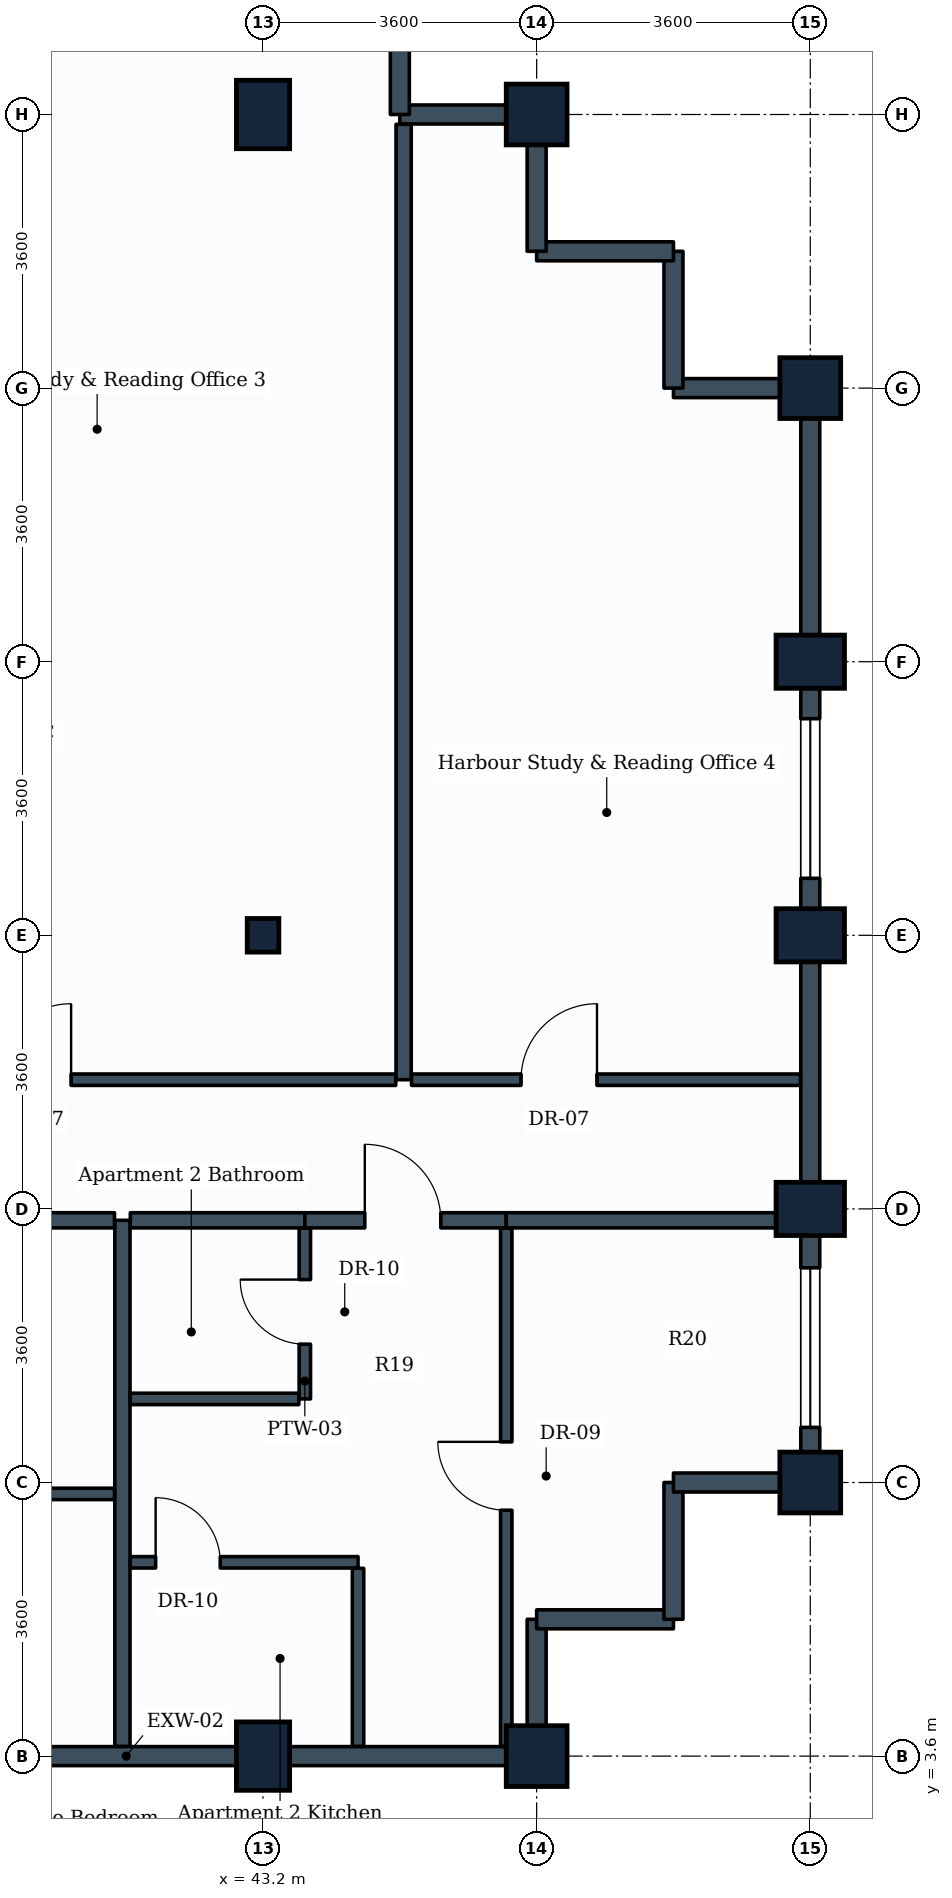
"""IFC4 building model, lengths in metres.
Left out: names, types, materials, properties, quantities, classifications, styles, units other than length and angle.
Written with IfcOpenShell. Run it as: python <this file> out.ifc"""

import sys

from ifc_helpers import new_model, si_unit, direction, frame, frame_2d, origin, origin_2d, place, context, subcontext, project, spatial, rectangle, i_section, extrude, element, fill, save


model = new_model("IFC4")
c1 = context("Model", 3, precision=1e-05, world=origin(), true_north=direction((0.0, 1.0)))
c2 = subcontext(c1, "Body", "Model", "MODEL_VIEW")
j1 = project(units=[si_unit("LENGTHUNIT", "METRE"), si_unit("PLANEANGLEUNIT", "RADIAN")], contexts=[c1])
p1 = place(None, origin())
s1 = spatial("IfcSite", under=j1, at=p1, CompositionType="ELEMENT")
p2 = place(p1, origin())
s2 = spatial("IfcBuilding", under=s1, at=p2, CompositionType="ELEMENT")
p3 = place(p2, frame((0.0, 0.0, 186.2)))
s3 = spatial("IfcBuildingStorey", under=s2, at=p3, CompositionType="ELEMENT", Elevation=186.2)
p4 = place(p3, frame((43.2, 3.6, 0.0), z_axis=(0.0, 0.0, 1.0), x_axis=(1.0, 0.0, 0.0)))
e1 = element("IfcColumn", 1, at=p4, inside=s3, PredefinedType="COLUMN", context=c2, shape_type="SweptSolid", body=[
    extrude(rectangle(XDim=0.7, YDim=0.9, at=origin_2d()), origin(), (0.0, 0.0, 1.0), 3.8),
])
p5 = place(p3, frame((43.2, 14.4, 0.0), z_axis=(0.0, 0.0, 1.0), x_axis=(1.0, 0.0, 0.0)))
e2 = element("IfcColumn", 2, at=p5, inside=s3, PredefinedType="COLUMN", context=c2, shape_type="SweptSolid", body=[
    extrude(i_section(OverallWidth=0.416, OverallDepth=0.442, WebThickness=0.025, FlangeThickness=0.041, FilletRadius=0.015, at=origin_2d()), origin(), (0.0, 0.0, 1.0), 3.8),
])
p6 = place(p3, frame((43.2, 25.2, 0.0), z_axis=(0.0, 0.0, 1.0), x_axis=(1.0, 0.0, 0.0)))
e3 = element("IfcColumn", 3, at=p6, inside=s3, PredefinedType="COLUMN", context=c2, shape_type="SweptSolid", body=[
    extrude(rectangle(XDim=0.7, YDim=0.9, at=origin_2d()), origin(), (0.0, 0.0, 1.0), 3.8),
])
for number, where, z_axis, x_axis in (
    (4, (46.8, 3.6, 0.0), (0.0, 0.0, 1.0), (1.0, 0.0, 0.0)),
    (5, (46.8, 25.2, 0.0), (0.0, 0.0, 1.0), (1.0, 0.0, 0.0)),
    (6, (50.4, 7.2, 0.0), (0.0, 0.0, 1.0), (1.0, 0.0, 0.0)),
):
    element("IfcColumn", number, at=place(p3, frame(where, z_axis=z_axis, x_axis=x_axis)), inside=s3, PredefinedType="COLUMN", context=c2, shape_type="SweptSolid", body=[
        extrude(rectangle(XDim=0.8, YDim=0.8, at=origin_2d()), origin(), (0.0, 0.0, 1.0), 3.8),
    ])
for number, where, z_axis, x_axis in (
    (7, (50.4, 10.8, 0.0), (0.0, 0.0, 1.0), (0.0, 1.0, 0.0)),
    (8, (50.4, 14.4, 0.0), (0.0, 0.0, 1.0), (0.0, 1.0, 0.0)),
    (9, (50.4, 18.0, 0.0), (0.0, 0.0, 1.0), (0.0, 1.0, 0.0)),
):
    element("IfcColumn", number, at=place(p3, frame(where, z_axis=z_axis, x_axis=x_axis)), inside=s3, PredefinedType="COLUMN", context=c2, shape_type="SweptSolid", body=[
        extrude(rectangle(XDim=0.7, YDim=0.9, at=origin_2d()), origin(), (0.0, 0.0, 1.0), 3.8),
    ])
p7 = place(p3, frame((50.4, 21.6, 0.0), z_axis=(0.0, 0.0, 1.0), x_axis=(0.0, 1.0, 0.0)))
e10 = element("IfcColumn", 10, at=p7, inside=s3, PredefinedType="COLUMN", context=c2, shape_type="SweptSolid", body=[
    extrude(rectangle(XDim=0.8, YDim=0.8, at=origin_2d()), origin(), (0.0, 0.0, 1.0), 3.8),
])
p8 = place(p3, frame((43.2, 3.6, 0.0), z_axis=(0.0, 0.0, 1.0), x_axis=(-1.0, 0.0, 0.0)))
e11 = element("IfcWall", 11, at=p8, inside=s3, PredefinedType="STANDARD", context=c2, shape_type="SweptSolid", body=[
    extrude(rectangle(XDim=3.6, YDim=0.25, at=frame_2d((1.8, 0.0))), origin(), (0.0, 0.0, 1.0), 2.93),
])
p9 = place(p3, frame((46.8, 3.6, 0.0), z_axis=(0.0, 0.0, 1.0), x_axis=(-1.0, 0.0, 0.0)))
e12 = element("IfcWall", 12, at=p9, inside=s3, PredefinedType="STANDARD", context=c2, shape_type="SweptSolid", body=[
    extrude(rectangle(XDim=3.6, YDim=0.25, at=frame_2d((1.8, 0.0))), origin(), (0.0, 0.0, 1.0), 2.93),
])
p10 = place(p3, frame((46.8, 5.4, 0.0), z_axis=(0.0, 0.0, 1.0), x_axis=(0.0, -1.0, 0.0)))
e13 = element("IfcWall", 13, at=p10, inside=s3, PredefinedType="STANDARD", context=c2, shape_type="SweptSolid", body=[
    extrude(rectangle(XDim=1.8, YDim=0.25, at=frame_2d((0.9, 0.0))), origin(), (0.0, 0.0, 1.0), 2.93),
])
for number, where, z_axis, x_axis in (
    (14, (48.6, 5.4, 0.0), (0.0, 0.0, 1.0), (-1.0, 0.0, 0.0)),
    (15, (48.6, 7.2, 0.0), (0.0, 0.0, 1.0), (0.0, -1.0, 0.0)),
):
    element("IfcWall", number, at=place(p3, frame(where, z_axis=z_axis, x_axis=x_axis)), inside=s3, PredefinedType="STANDARD", context=c2, shape_type="SweptSolid", body=[
        extrude(rectangle(XDim=1.8, YDim=0.25, at=frame_2d((0.9, 0.0))), origin(), (0.0, 0.0, 1.0), 3.535),
    ])
p11 = place(p3, frame((50.4, 7.2, 0.0), z_axis=(0.0, 0.0, 1.0), x_axis=(-1.0, 0.0, 0.0)))
e16 = element("IfcWall", 16, at=p11, inside=s3, PredefinedType="STANDARD", context=c2, shape_type="SweptSolid", body=[
    extrude(rectangle(XDim=1.8, YDim=0.25, at=frame_2d((0.9, 0.0))), origin(), (0.0, 0.0, 1.0), 2.93),
])
p12 = place(p3, frame((50.4, 10.8, 0.0), z_axis=(0.0, 0.0, 1.0), x_axis=(0.0, -1.0, 0.0)))
e17 = element("IfcWall", 17, at=p12, inside=s3, PredefinedType="STANDARD", context=c2, shape_type="SweptSolid", body=[
    extrude(rectangle(XDim=3.6, YDim=0.25, at=frame_2d((1.8, 0.0))), origin(), (0.0, 0.0, 1.0), 2.93),
])
p13 = place(p12, frame((0.775, 0.0, 0.85)))
e18 = element("IfcOpeningElement", 18, at=p13, cuts=e17, PredefinedType="OPENING", context=c2, shape_type="SweptSolid", body=[
    extrude(rectangle(XDim=2.1, YDim=1.35, at=frame_2d((1.05, 0.675))), frame((0.0, 0.135, 0.0), z_axis=(0.0, -1.0, 0.0), x_axis=(1.0, 0.0, 0.0)), (0.0, 0.0, 1.0), 0.27),
])
p14 = place(p3, frame((50.4, 14.4, 0.0), z_axis=(0.0, 0.0, 1.0), x_axis=(0.0, -1.0, 0.0)))
e19 = element("IfcWall", 19, at=p14, inside=s3, PredefinedType="STANDARD", context=c2, shape_type="SweptSolid", body=[
    extrude(rectangle(XDim=3.6, YDim=0.25, at=frame_2d((1.8, 0.0))), origin(), (0.0, 0.0, 1.0), 2.93),
])
p15 = place(p3, frame((50.4, 18.0, 0.0), z_axis=(0.0, 0.0, 1.0), x_axis=(0.0, -1.0, 0.0)))
e20 = element("IfcWall", 20, at=p15, inside=s3, PredefinedType="STANDARD", context=c2, shape_type="SweptSolid", body=[
    extrude(rectangle(XDim=3.6, YDim=0.25, at=frame_2d((1.8, 0.0))), origin(), (0.0, 0.0, 1.0), 2.93),
])
p16 = place(p15, frame((0.75, 0.0, 0.85)))
e21 = element("IfcOpeningElement", 21, at=p16, cuts=e20, PredefinedType="OPENING", context=c2, shape_type="SweptSolid", body=[
    extrude(rectangle(XDim=2.1, YDim=1.35, at=frame_2d((1.05, 0.675))), frame((0.0, 0.135, 0.0), z_axis=(0.0, -1.0, 0.0), x_axis=(1.0, 0.0, 0.0)), (0.0, 0.0, 1.0), 0.27),
])
p17 = place(p3, frame((50.4, 21.6, 0.0), z_axis=(0.0, 0.0, 1.0), x_axis=(0.0, -1.0, 0.0)))
e22 = element("IfcWall", 22, at=p17, inside=s3, PredefinedType="STANDARD", context=c2, shape_type="SweptSolid", body=[
    extrude(rectangle(XDim=3.6, YDim=0.25, at=frame_2d((1.8, 0.0))), origin(), (0.0, 0.0, 1.0), 2.93),
])
p18 = place(p3, frame((48.6, 21.6, 0.0), z_axis=(0.0, 0.0, 1.0), x_axis=(1.0, 0.0, 0.0)))
e23 = element("IfcWall", 23, at=p18, inside=s3, PredefinedType="STANDARD", context=c2, shape_type="SweptSolid", body=[
    extrude(rectangle(XDim=1.8, YDim=0.25, at=frame_2d((0.9, 0.0))), origin(), (0.0, 0.0, 1.0), 2.93),
])
p19 = place(p3, frame((48.6, 23.4, 0.0), z_axis=(0.0, 0.0, 1.0), x_axis=(0.0, -1.0, 0.0)))
e24 = element("IfcWall", 24, at=p19, inside=s3, PredefinedType="STANDARD", context=c2, shape_type="SweptSolid", body=[
    extrude(rectangle(XDim=1.8, YDim=0.25, at=frame_2d((0.9, 0.0))), origin(), (0.0, 0.0, 1.0), 3.535),
])
p20 = place(p3, frame((46.8, 23.4, 0.0), z_axis=(0.0, 0.0, 1.0), x_axis=(1.0, 0.0, 0.0)))
e25 = element("IfcWall", 25, at=p20, inside=s3, PredefinedType="STANDARD", context=c2, shape_type="SweptSolid", body=[
    extrude(rectangle(XDim=1.8, YDim=0.25, at=frame_2d((0.9, 0.0))), origin(), (0.0, 0.0, 1.0), 3.535),
])
for number, where, z_axis, x_axis in (
    (26, (46.8, 25.2, 0.0), (0.0, 0.0, 1.0), (0.0, -1.0, 0.0)),
    (27, (45.0, 25.2, 0.0), (0.0, 0.0, 1.0), (1.0, 0.0, 0.0)),
):
    element("IfcWall", number, at=place(p3, frame(where, z_axis=z_axis, x_axis=x_axis)), inside=s3, PredefinedType="STANDARD", context=c2, shape_type="SweptSolid", body=[
        extrude(rectangle(XDim=1.8, YDim=0.25, at=frame_2d((0.9, 0.0))), origin(), (0.0, 0.0, 1.0), 2.93),
    ])
p21 = place(p3, frame((45.0, 27.3, 0.0), z_axis=(0.0, 0.0, 1.0), x_axis=(0.0, -1.0, 0.0)))
e28 = element("IfcWall", 28, at=p21, inside=s3, PredefinedType="STANDARD", context=c2, shape_type="SweptSolid", body=[
    extrude(rectangle(XDim=2.1, YDim=0.25, at=frame_2d((1.05, 0.0))), origin(), (0.0, 0.0, 1.0), 2.93),
])
p22 = place(p3, frame((41.35, 3.729, 0.0), z_axis=(0.0, 0.0, 1.0), x_axis=(0.0, 1.0, 0.0)))
e29 = element("IfcWall", 29, at=p22, inside=s3, PredefinedType="PARTITIONING", context=c2, shape_type="SweptSolid", body=[
    extrude(rectangle(XDim=6.921, YDim=0.2, at=frame_2d((3.46, 0.0))), origin(), (0.0, 0.0, 1.0), 2.93),
])
p23 = place(p3, frame((36.8, 10.65, 0.0), z_axis=(0.0, 0.0, 1.0), x_axis=(1.0, 0.0, 0.0)))
e30 = element("IfcWall", 30, at=p23, inside=s3, PredefinedType="PARTITIONING", context=c2, shape_type="SweptSolid", body=[
    extrude(rectangle(XDim=4.446, YDim=0.2, at=frame_2d((2.223, 0.0))), origin(), (0.0, 0.0, 1.0), 3.17),
])
p24 = place(p23, frame((1.775, 0.0, 0.0)))
e31 = element("IfcOpeningElement", 31, at=p24, cuts=e30, PredefinedType="OPENING", context=c2, shape_type="SweptSolid", body=[
    extrude(rectangle(XDim=1.0, YDim=2.1, at=frame_2d((0.5, 1.05))), frame((0.0, 0.11, 0.0), z_axis=(0.0, -1.0, 0.0), x_axis=(1.0, 0.0, 0.0)), (0.0, 0.0, 1.0), 0.22),
])
p25 = place(p3, frame((37.5, 7.05, 0.0), z_axis=(0.0, 0.0, 1.0), x_axis=(1.0, 0.0, 0.0)))
e32 = element("IfcWall", 32, at=p25, inside=s3, PredefinedType="PARTITIONING", context=c2, shape_type="SweptSolid", body=[
    extrude(rectangle(XDim=3.746, YDim=0.15, at=frame_2d((1.873, 0.0))), origin(), (0.0, 0.0, 1.0), 3.17),
])
p26 = place(p25, frame((0.44, 0.0, 0.0)))
e33 = element("IfcOpeningElement", 33, at=p26, cuts=e32, PredefinedType="OPENING", context=c2, shape_type="SweptSolid", body=[
    extrude(rectangle(XDim=0.9, YDim=2.1, at=frame_2d((0.45, 1.05))), frame((0.0, 0.085, 0.0), z_axis=(0.0, -1.0, 0.0), x_axis=(1.0, 0.0, 0.0)), (0.0, 0.0, 1.0), 0.17),
])
p27 = place(p3, frame((41.454, 10.65, 0.0), z_axis=(0.0, 0.0, 1.0), x_axis=(1.0, 0.0, 0.0)))
e34 = element("IfcWall", 34, at=p27, inside=s3, PredefinedType="PARTITIONING", context=c2, shape_type="SweptSolid", body=[
    extrude(rectangle(XDim=2.296, YDim=0.2, at=frame_2d((1.148, 0.0))), origin(), (0.0, 0.0, 1.0), 3.17),
])
p28 = place(p3, frame((43.75, 8.3, 0.0), z_axis=(0.0, 0.0, 1.0), x_axis=(0.0, 1.0, 0.0)))
e35 = element("IfcWall", 35, at=p28, inside=s3, PredefinedType="PARTITIONING", context=c2, shape_type="SweptSolid", body=[
    extrude(rectangle(XDim=2.246, YDim=0.15, at=frame_2d((1.123, 0.0))), origin(), (0.0, 0.0, 1.0), 3.535),
])
p29 = place(p28, frame((0.72, 0.0, 0.0)))
e36 = element("IfcOpeningElement", 36, at=p29, cuts=e35, PredefinedType="OPENING", context=c2, shape_type="SweptSolid", body=[
    extrude(rectangle(XDim=0.85, YDim=2.1, at=frame_2d((0.425, 1.05))), frame((0.0, 0.085, 0.0), z_axis=(0.0, -1.0, 0.0), x_axis=(1.0, 0.0, 0.0)), (0.0, 0.0, 1.0), 0.17),
])
p30 = place(p3, frame((41.454, 8.3, 0.0), z_axis=(0.0, 0.0, 1.0), x_axis=(1.0, 0.0, 0.0)))
e37 = element("IfcWall", 37, at=p30, inside=s3, PredefinedType="PARTITIONING", context=c2, shape_type="SweptSolid", body=[
    extrude(rectangle(XDim=2.217, YDim=0.15, at=frame_2d((1.108, 0.0))), origin(), (0.0, 0.0, 1.0), 3.18),
])
p31 = place(p3, frame((43.75, 10.65, 0.0), z_axis=(0.0, 0.0, 1.0), x_axis=(1.0, 0.0, 0.0)))
e38 = element("IfcWall", 38, at=p31, inside=s3, PredefinedType="PARTITIONING", context=c2, shape_type="SweptSolid", body=[
    extrude(rectangle(XDim=2.65, YDim=0.2, at=frame_2d((1.325, 0.0))), origin(), (0.0, 0.0, 1.0), 3.535),
])
p32 = place(p31, frame((0.789, 0.0, 0.0)))
e39 = element("IfcOpeningElement", 39, at=p32, cuts=e38, PredefinedType="OPENING", context=c2, shape_type="SweptSolid", body=[
    extrude(rectangle(XDim=1.0, YDim=2.1, at=frame_2d((0.5, 1.05))), frame((0.0, 0.11, 0.0), z_axis=(0.0, -1.0, 0.0), x_axis=(1.0, 0.0, 0.0)), (0.0, 0.0, 1.0), 0.22),
])
p33 = place(p3, frame((46.4, 10.65, 0.0), z_axis=(0.0, 0.0, 1.0), x_axis=(1.0, 0.0, 0.0)))
e40 = element("IfcWall", 40, at=p33, inside=s3, PredefinedType="PARTITIONING", context=c2, shape_type="SweptSolid", body=[
    extrude(rectangle(XDim=3.871, YDim=0.2, at=frame_2d((1.936, 0.0))), origin(), (0.0, 0.0, 1.0), 2.93),
])
p34 = place(p3, frame((46.4, 3.729, 0.0), z_axis=(0.0, 0.0, 1.0), x_axis=(0.0, 1.0, 0.0)))
e41 = element("IfcWall", 41, at=p34, inside=s3, PredefinedType="PARTITIONING", context=c2, shape_type="SweptSolid", body=[
    extrude(rectangle(XDim=6.817, YDim=0.15, at=frame_2d((3.408, 0.0))), origin(), (0.0, 0.0, 1.0), 2.93),
])
p35 = place(p34, frame((3.106, 0.0, 0.0)))
e42 = element("IfcOpeningElement", 42, at=p35, cuts=e41, PredefinedType="OPENING", context=c2, shape_type="SweptSolid", body=[
    extrude(rectangle(XDim=0.9, YDim=2.1, at=frame_2d((0.45, 1.05))), frame((0.0, 0.085, 0.0), z_axis=(0.0, -1.0, 0.0), x_axis=(1.0, 0.0, 0.0)), (0.0, 0.0, 1.0), 0.17),
])
p36 = place(p3, frame((41.454, 6.15, 0.0), z_axis=(0.0, 0.0, 1.0), x_axis=(1.0, 0.0, 0.0)))
e43 = element("IfcWall", 43, at=p36, inside=s3, PredefinedType="PARTITIONING", context=c2, shape_type="SweptSolid", body=[
    extrude(rectangle(XDim=2.996, YDim=0.15, at=frame_2d((1.498, 0.0))), origin(), (0.0, 0.0, 1.0), 3.18),
])
p37 = place(p36, frame((0.333, 0.0, 0.0)))
e44 = element("IfcOpeningElement", 44, at=p37, cuts=e43, PredefinedType="OPENING", context=c2, shape_type="SweptSolid", body=[
    extrude(rectangle(XDim=0.85, YDim=2.1, at=frame_2d((0.425, 1.05))), frame((0.0, 0.085, 0.0), z_axis=(0.0, -1.0, 0.0), x_axis=(1.0, 0.0, 0.0)), (0.0, 0.0, 1.0), 0.17),
])
p38 = place(p3, frame((44.45, 3.729, 0.0), z_axis=(0.0, 0.0, 1.0), x_axis=(0.0, 1.0, 0.0)))
e45 = element("IfcWall", 45, at=p38, inside=s3, PredefinedType="PARTITIONING", context=c2, shape_type="SweptSolid", body=[
    extrude(rectangle(XDim=2.342, YDim=0.15, at=frame_2d((1.171, 0.0))), origin(), (0.0, 0.0, 1.0), 2.93),
])
p39 = place(p3, frame((45.05, 12.5, 0.0), z_axis=(0.0, 0.0, 1.0), x_axis=(0.0, 1.0, 0.0)))
e46 = element("IfcWall", 46, at=p39, inside=s3, PredefinedType="PARTITIONING", context=c2, shape_type="SweptSolid", body=[
    extrude(rectangle(XDim=12.571, YDim=0.2, at=frame_2d((6.286, 0.0))), origin(), (0.0, 0.0, 1.0), 2.93),
])
p40 = place(p3, frame((39.0, 12.5, 0.0), z_axis=(0.0, 0.0, 1.0), x_axis=(1.0, 0.0, 0.0)))
e47 = element("IfcWall", 47, at=p40, inside=s3, PredefinedType="PARTITIONING", context=c2, shape_type="SweptSolid", body=[
    extrude(rectangle(XDim=5.946, YDim=0.15, at=frame_2d((2.973, 0.0))), origin(), (0.0, 0.0, 1.0), 3.17),
])
p41 = place(p40, frame((0.675, 0.0, 0.0)))
e48 = element("IfcOpeningElement", 48, at=p41, cuts=e47, PredefinedType="OPENING", context=c2, shape_type="SweptSolid", body=[
    extrude(rectangle(XDim=1.0, YDim=2.1, at=frame_2d((0.5, 1.05))), frame((0.0, 0.085, 0.0), z_axis=(0.0, -1.0, 0.0), x_axis=(1.0, 0.0, 0.0)), (0.0, 0.0, 1.0), 0.17),
])
p42 = place(p3, frame((45.154, 12.5, 0.0), z_axis=(0.0, 0.0, 1.0), x_axis=(1.0, 0.0, 0.0)))
e49 = element("IfcWall", 49, at=p42, inside=s3, PredefinedType="PARTITIONING", context=c2, shape_type="SweptSolid", body=[
    extrude(rectangle(XDim=5.117, YDim=0.15, at=frame_2d((2.559, 0.0))), origin(), (0.0, 0.0, 1.0), 2.93),
])
p43 = place(p42, frame((1.44, 0.0, 0.0)))
e50 = element("IfcOpeningElement", 50, at=p43, cuts=e49, PredefinedType="OPENING", context=c2, shape_type="SweptSolid", body=[
    extrude(rectangle(XDim=1.0, YDim=2.1, at=frame_2d((0.5, 1.05))), frame((0.0, 0.085, 0.0), z_axis=(0.0, -1.0, 0.0), x_axis=(1.0, 0.0, 0.0)), (0.0, 0.0, 1.0), 0.17),
])
p44 = place(p13, origin())
e51 = element("IfcWindow", 51, at=p44, inside=s3, PartitioningType="SINGLE_PANEL", PredefinedType="WINDOW", context=c2, shape_type="SweptSolid", body=[
    extrude(rectangle(XDim=2.1, YDim=1.35, at=frame_2d((1.05, 0.675))), frame((0.0, 0.03, 0.0), z_axis=(0.0, -1.0, 0.0), x_axis=(1.0, 0.0, 0.0)), (0.0, 0.0, 1.0), 0.06),
])
fill(e18, e51)
p45 = place(p16, origin())
e52 = element("IfcWindow", 52, at=p45, inside=s3, PartitioningType="SINGLE_PANEL", PredefinedType="WINDOW", context=c2, shape_type="SweptSolid", body=[
    extrude(rectangle(XDim=2.1, YDim=1.35, at=frame_2d((1.05, 0.675))), frame((0.0, 0.03, 0.0), z_axis=(0.0, -1.0, 0.0), x_axis=(1.0, 0.0, 0.0)), (0.0, 0.0, 1.0), 0.06),
])
fill(e21, e52)
p46 = place(p29, origin())
e53 = element("IfcDoor", 53, at=p46, inside=s3, OperationType="SINGLE_SWING_RIGHT", PredefinedType="DOOR", context=c2, shape_type="SweptSolid", body=[
    extrude(rectangle(XDim=0.85, YDim=2.1, at=frame_2d((0.425, 1.05))), frame((0.0, 0.025, 0.0), z_axis=(0.0, -1.0, 0.0), x_axis=(1.0, 0.0, 0.0)), (0.0, 0.0, 1.0), 0.05),
])
fill(e36, e53)
p47 = place(p32, origin())
e54 = element("IfcDoor", 54, at=p47, inside=s3, OperationType="SINGLE_SWING_LEFT", PredefinedType="DOOR", context=c2, shape_type="SweptSolid", body=[
    extrude(rectangle(XDim=1.0, YDim=2.1, at=frame_2d((0.5, 1.05))), frame((0.0, 0.025, 0.0), z_axis=(0.0, -1.0, 0.0), x_axis=(1.0, 0.0, 0.0)), (0.0, 0.0, 1.0), 0.05),
])
fill(e39, e54)
p48 = place(p35, origin())
e55 = element("IfcDoor", 55, at=p48, inside=s3, OperationType="SINGLE_SWING_RIGHT", PredefinedType="DOOR", context=c2, shape_type="SweptSolid", body=[
    extrude(rectangle(XDim=0.9, YDim=2.1, at=frame_2d((0.45, 1.05))), frame((0.0, 0.025, 0.0), z_axis=(0.0, -1.0, 0.0), x_axis=(1.0, 0.0, 0.0)), (0.0, 0.0, 1.0), 0.05),
])
fill(e42, e55)
p49 = place(p37, origin())
e56 = element("IfcDoor", 56, at=p49, inside=s3, OperationType="SINGLE_SWING_LEFT", PredefinedType="DOOR", context=c2, shape_type="SweptSolid", body=[
    extrude(rectangle(XDim=0.85, YDim=2.1, at=frame_2d((0.425, 1.05))), frame((0.0, 0.025, 0.0), z_axis=(0.0, -1.0, 0.0), x_axis=(1.0, 0.0, 0.0)), (0.0, 0.0, 1.0), 0.05),
])
fill(e44, e56)
p50 = place(p41, origin())
e57 = element("IfcDoor", 57, at=p50, inside=s3, OperationType="SINGLE_SWING_RIGHT", PredefinedType="DOOR", context=c2, shape_type="SweptSolid", body=[
    extrude(rectangle(XDim=1.0, YDim=2.1, at=frame_2d((0.5, 1.05))), frame((0.0, 0.025, 0.0), z_axis=(0.0, -1.0, 0.0), x_axis=(1.0, 0.0, 0.0)), (0.0, 0.0, 1.0), 0.05),
])
fill(e48, e57)
p51 = place(p43, origin())
e58 = element("IfcDoor", 58, at=p51, inside=s3, OperationType="SINGLE_SWING_RIGHT", PredefinedType="DOOR", context=c2, shape_type="SweptSolid", body=[
    extrude(rectangle(XDim=1.0, YDim=2.1, at=frame_2d((0.5, 1.05))), frame((0.0, 0.025, 0.0), z_axis=(0.0, -1.0, 0.0), x_axis=(1.0, 0.0, 0.0)), (0.0, 0.0, 1.0), 0.05),
])
fill(e50, e58)
save(model, sys.argv[1])
